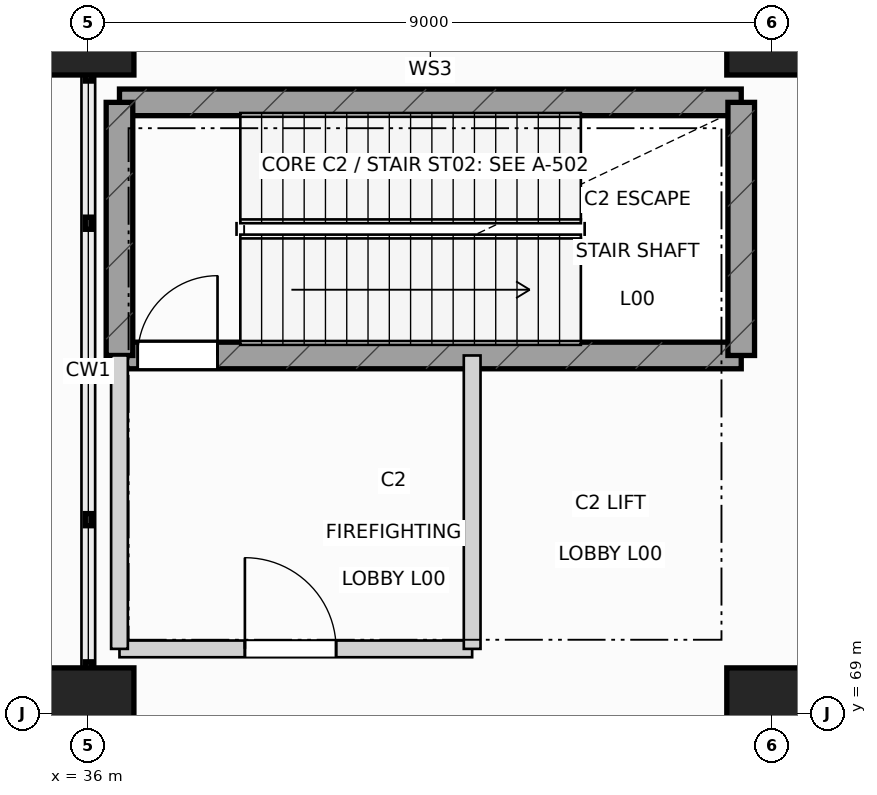
"""IFC4 building model, lengths in metres.
Left out: names, types, materials, properties, quantities, classifications, styles, units other than length and angle.
Written with IfcOpenShell. Run it as: python <this file> out.ifc"""

import sys

from ifc_helpers import new_model, si_unit, direction, frame, frame_2d, origin, origin_2d, place, context, subcontext, project, spatial, rectangle, extrude, element, fill, save


model = new_model("IFC4")
c1 = context("Model", 3, precision=1e-05, world=origin(), true_north=direction((0.0, 1.0)))
c2 = subcontext(c1, "Body", "Model", "MODEL_VIEW")
j1 = project(units=[si_unit("LENGTHUNIT", "METRE"), si_unit("PLANEANGLEUNIT", "RADIAN")], contexts=[c1])
p1 = place(None, origin())
s1 = spatial("IfcSite", under=j1, at=p1, CompositionType="ELEMENT")
p2 = place(p1, origin())
s2 = spatial("IfcBuilding", under=s1, at=p2, CompositionType="ELEMENT")
p3 = place(p2, origin())
s3 = spatial("IfcBuildingStorey", under=s2, at=p3, CompositionType="ELEMENT", Elevation=0.0)
for number, where, z_axis, x_axis in (
    (1, (36.0, 69.0, 0.0), (0.0, 0.0, 1.0), (1.0, 0.0, 0.0)),
    (2, (36.0, 78.0, 0.0), (0.0, 0.0, 1.0), (1.0, 0.0, 0.0)),
    (3, (45.0, 69.0, 0.0), (0.0, 0.0, 1.0), (1.0, 0.0, 0.0)),
    (4, (45.0, 78.0, 0.0), (0.0, 0.0, 1.0), (1.0, 0.0, 0.0)),
):
    element("IfcColumn", number, at=place(p3, frame(where, z_axis=z_axis, x_axis=x_axis)), inside=s3, PredefinedType="COLUMN", context=c2, shape_type="SweptSolid", body=[
        extrude(rectangle(XDim=1.2, YDim=1.2, at=origin_2d()), origin(), (0.0, 0.0, 1.0), 6.0),
    ])
p4 = place(p3, frame((36.41, 73.71, 0.0), z_axis=(0.0, 0.0, 1.0), x_axis=(1.0, 0.0, 0.0)))
e5 = element("IfcWall", 5, at=p4, inside=s3, PredefinedType="SHEAR", context=c2, shape_type="SweptSolid", body=[
    extrude(rectangle(XDim=8.18, YDim=0.35, at=frame_2d((4.09, 0.0))), origin(), (0.0, 0.0, 1.0), 5.7),
])
p5 = place(p4, frame((0.24, 0.0, 0.0)))
e6 = element("IfcOpeningElement", 6, at=p5, cuts=e5, PredefinedType="OPENING", context=c2, shape_type="SweptSolid", body=[
    extrude(rectangle(XDim=1.05, YDim=2.18, at=frame_2d((0.525, 1.09))), frame((0.0, 0.185, 0.0), z_axis=(0.0, -1.0, 0.0), x_axis=(1.0, 0.0, 0.0)), (0.0, 0.0, 1.0), 0.37),
])
p6 = place(p3, frame((36.41, 77.04, 0.0), z_axis=(0.0, 0.0, 1.0), x_axis=(1.0, 0.0, 0.0)))
e7 = element("IfcWall", 7, at=p6, inside=s3, PredefinedType="SHEAR", context=c2, shape_type="SweptSolid", body=[
    extrude(rectangle(XDim=8.18, YDim=0.35, at=frame_2d((4.09, 0.0))), origin(), (0.0, 0.0, 1.0), 5.7),
])
for number, where, z_axis, x_axis in (
    (8, (36.41, 73.71, 0.0), (0.0, 0.0, 1.0), (0.0, 1.0, 0.0)),
    (9, (44.59, 73.71, 0.0), (0.0, 0.0, 1.0), (0.0, 1.0, 0.0)),
):
    element("IfcWall", number, at=place(p3, frame(where, z_axis=z_axis, x_axis=x_axis)), inside=s3, PredefinedType="SHEAR", context=c2, shape_type="SweptSolid", body=[
        extrude(rectangle(XDim=3.33, YDim=0.35, at=frame_2d((1.665, 0.0))), origin(), (0.0, 0.0, 1.0), 5.7),
    ])
p7 = place(p3, frame((36.41, 69.85, 0.0), z_axis=(0.0, 0.0, 1.0), x_axis=(1.0, 0.0, 0.0)))
e10 = element("IfcWall", 10, at=p7, inside=s3, PredefinedType="PARTITIONING", context=c2, shape_type="SweptSolid", body=[
    extrude(rectangle(XDim=4.64, YDim=0.22, at=frame_2d((2.32, 0.0))), origin(), (0.0, 0.0, 1.0), 5.065),
])
p8 = place(p7, frame((1.65, 0.0, 0.0)))
e11 = element("IfcOpeningElement", 11, at=p8, cuts=e10, PredefinedType="OPENING", context=c2, shape_type="SweptSolid", body=[
    extrude(rectangle(XDim=1.2, YDim=2.18, at=frame_2d((0.6, 1.09))), frame((0.0, 0.12, 0.0), z_axis=(0.0, -1.0, 0.0), x_axis=(1.0, 0.0, 0.0)), (0.0, 0.0, 1.0), 0.24),
])
p9 = place(p3, frame((36.41, 69.85, 0.0), z_axis=(0.0, 0.0, 1.0), x_axis=(0.0, 1.0, 0.0)))
e12 = element("IfcWall", 12, at=p9, inside=s3, PredefinedType="PARTITIONING", context=c2, shape_type="SweptSolid", body=[
    extrude(rectangle(XDim=3.86, YDim=0.22, at=frame_2d((1.93, 0.0))), origin(), (0.0, 0.0, 1.0), 5.065),
])
p10 = place(p3, frame((41.05, 69.85, 0.0), z_axis=(0.0, 0.0, 1.0), x_axis=(0.0, 1.0, 0.0)))
e13 = element("IfcWall", 13, at=p10, inside=s3, PredefinedType="PARTITIONING", context=c2, shape_type="SweptSolid", body=[
    extrude(rectangle(XDim=3.86, YDim=0.22, at=frame_2d((1.93, 0.0))), origin(), (0.0, 0.0, 1.0), 5.305),
])
p11 = place(p5, origin())
e14 = element("IfcDoor", 14, at=p11, inside=s3, OperationType="SINGLE_SWING_RIGHT", PredefinedType="DOOR", context=c2, shape_type="SweptSolid", body=[
    extrude(rectangle(XDim=1.05, YDim=2.18, at=frame_2d((0.525, 1.09))), frame((0.0, 0.025, 0.0), z_axis=(0.0, -1.0, 0.0), x_axis=(1.0, 0.0, 0.0)), (0.0, 0.0, 1.0), 0.05),
])
fill(e6, e14)
p12 = place(p8, origin())
e15 = element("IfcDoor", 15, at=p12, inside=s3, OperationType="SINGLE_SWING_LEFT", PredefinedType="DOOR", context=c2, shape_type="SweptSolid", body=[
    extrude(rectangle(XDim=1.2, YDim=2.18, at=frame_2d((0.6, 1.09))), frame((0.0, 0.025, 0.0), z_axis=(0.0, -1.0, 0.0), x_axis=(1.0, 0.0, 0.0)), (0.0, 0.0, 1.0), 0.05),
])
fill(e11, e15)
save(model, sys.argv[1])
